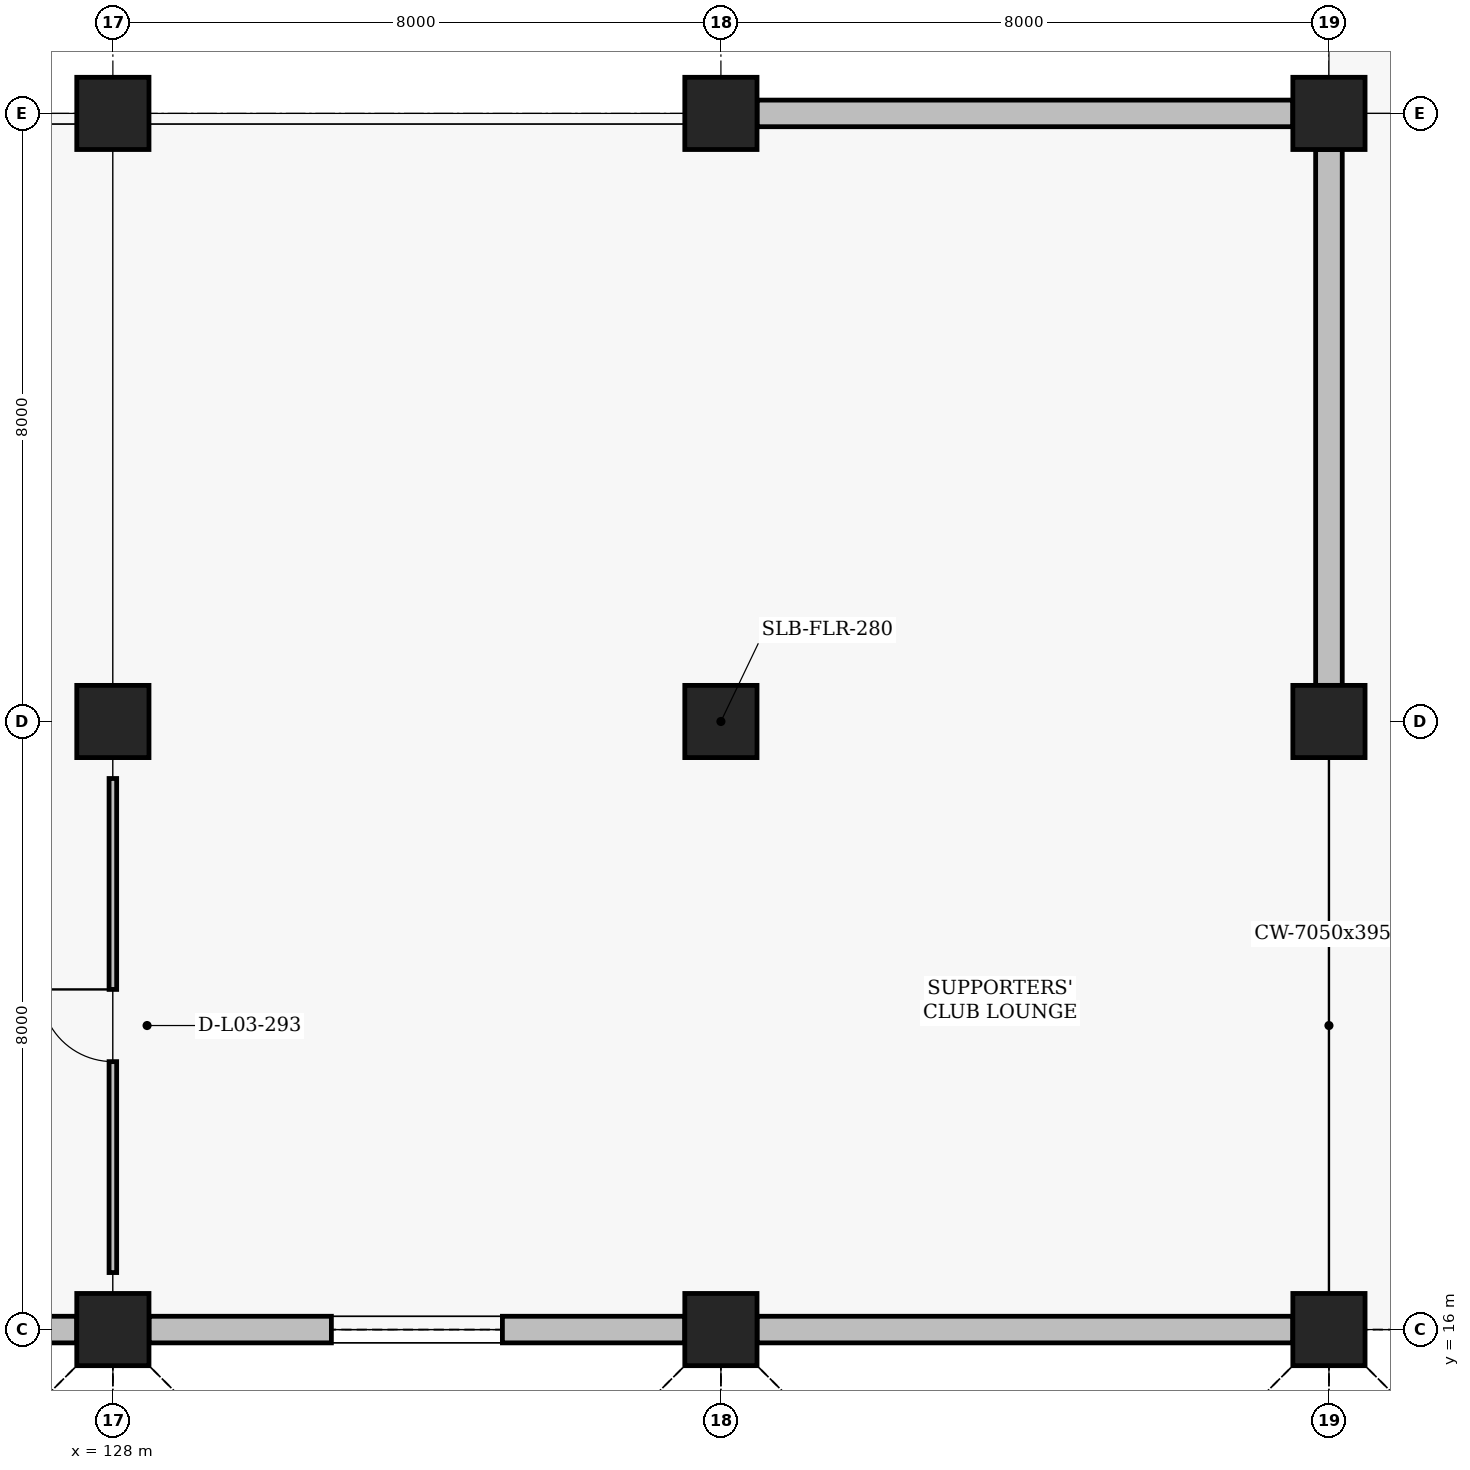
"""IFC4 building model, lengths in metres.
Left out: names, types, materials, properties, quantities, classifications, styles, units other than length and angle.
Written with IfcOpenShell. Run it as: python <this file> out.ifc"""

import sys

from ifc_helpers import new_model, si_unit, direction, frame, frame_2d, origin, origin_2d, place, context, subcontext, project, spatial, rectangle, extrude, element, fill, save


model = new_model("IFC4")
c1 = context("Model", 3, precision=1e-05, world=origin(), true_north=direction((0.0, 1.0)))
c2 = subcontext(c1, "Body", "Model", "MODEL_VIEW")
j1 = project(units=[si_unit("LENGTHUNIT", "METRE"), si_unit("PLANEANGLEUNIT", "RADIAN")], contexts=[c1])
p1 = place(None, origin())
s1 = spatial("IfcSite", under=j1, at=p1, CompositionType="ELEMENT")
p2 = place(p1, origin())
s2 = spatial("IfcBuilding", under=s1, at=p2, CompositionType="ELEMENT")
p3 = place(p2, frame((0.0, 0.0, 9.6)))
s3 = spatial("IfcBuildingStorey", under=s2, at=p3, CompositionType="ELEMENT", Elevation=9.6)
for number, where, z_axis, x_axis in (
    (1, (128.0, 16.0, 0.0), (0.0, 0.0, 1.0), (1.0, 0.0, 0.0)),
    (2, (128.0, 24.0, 0.0), (0.0, 0.0, 1.0), (1.0, 0.0, 0.0)),
    (3, (128.0, 32.0, 0.0), (0.0, 0.0, 1.0), (1.0, 0.0, 0.0)),
    (4, (136.0, 16.0, 0.0), (0.0, 0.0, 1.0), (1.0, 0.0, 0.0)),
    (5, (136.0, 24.0, 0.0), (0.0, 0.0, 1.0), (1.0, 0.0, 0.0)),
    (6, (136.0, 32.0, 0.0), (0.0, 0.0, 1.0), (1.0, 0.0, 0.0)),
    (7, (144.0, 16.0, 0.0), (0.0, 0.0, 1.0), (1.0, 0.0, 0.0)),
    (8, (144.0, 24.0, 0.0), (0.0, 0.0, 1.0), (1.0, 0.0, 0.0)),
    (9, (144.0, 32.0, 0.0), (0.0, 0.0, 1.0), (1.0, 0.0, 0.0)),
):
    element("IfcColumn", number, at=place(p3, frame(where, z_axis=z_axis, x_axis=x_axis)), inside=s3, PredefinedType="COLUMN", context=c2, shape_type="SweptSolid", body=[
        extrude(rectangle(XDim=0.95, YDim=0.95, at=origin_2d()), origin(), (0.0, 0.0, 1.0), 4.8),
    ])
p4 = place(p3, frame((120.475, 16.0, 0.0), z_axis=(0.0, 0.0, 1.0), x_axis=(1.0, 0.0, 0.0)))
e10 = element("IfcWall", 10, at=p4, inside=s3, PredefinedType="SOLIDWALL", context=c2, shape_type="SweptSolid", body=[
    extrude(rectangle(XDim=7.05, YDim=0.35, at=frame_2d((3.525, 0.0))), origin(), (0.0, 0.0, 1.0), 3.93),
])
p5 = place(p3, frame((128.475, 16.0, 0.0), z_axis=(0.0, 0.0, 1.0), x_axis=(1.0, 0.0, 0.0)))
e11 = element("IfcWall", 11, at=p5, inside=s3, PredefinedType="SOLIDWALL", context=c2, shape_type="SweptSolid", body=[
    extrude(rectangle(XDim=7.05, YDim=0.35, at=frame_2d((3.525, 0.0))), origin(), (0.0, 0.0, 1.0), 3.93),
])
p6 = place(p5, frame((2.4, 0.0, 0.95)))
e12 = element("IfcOpeningElement", 12, at=p6, cuts=e11, PredefinedType="OPENING", context=c2, shape_type="SweptSolid", body=[
    extrude(rectangle(XDim=2.25, YDim=1.9, at=frame_2d((1.125, 0.95))), frame((0.0, 0.185, 0.0), z_axis=(0.0, -1.0, 0.0), x_axis=(1.0, 0.0, 0.0)), (0.0, 0.0, 1.0), 0.37),
])
for number, where, z_axis, x_axis in (
    (13, (136.475, 16.0, 0.0), (0.0, 0.0, 1.0), (1.0, 0.0, 0.0)),
    (14, (136.475, 32.0, 0.0), (0.0, 0.0, 1.0), (1.0, 0.0, 0.0)),
):
    element("IfcWall", number, at=place(p3, frame(where, z_axis=z_axis, x_axis=x_axis)), inside=s3, PredefinedType="SOLIDWALL", context=c2, shape_type="SweptSolid", body=[
        extrude(rectangle(XDim=7.05, YDim=0.35, at=frame_2d((3.525, 0.0))), origin(), (0.0, 0.0, 1.0), 3.93),
    ])
p7 = place(p3, frame((144.0, 24.475, 0.0), z_axis=(0.0, 0.0, 1.0), x_axis=(0.0, 1.0, 0.0)))
e15 = element("IfcWall", 15, at=p7, inside=s3, PredefinedType="SOLIDWALL", context=c2, shape_type="SweptSolid", body=[
    extrude(rectangle(XDim=7.05, YDim=0.35, at=frame_2d((3.525, 0.0))), origin(), (0.0, 0.0, 1.0), 3.95),
])
p8 = place(p3, frame((128.0, 16.75, 0.0), z_axis=(0.0, 0.0, 1.0), x_axis=(0.0, 1.0, 0.0)))
e16 = element("IfcWall", 16, at=p8, inside=s3, PredefinedType="PARTITIONING", context=c2, shape_type="SweptSolid", body=[
    extrude(rectangle(XDim=6.5, YDim=0.1, at=frame_2d((3.25, 0.0))), origin(), (0.0, 0.0, 1.0), 3.93),
])
p9 = place(p8, frame((2.775, 0.0, 0.0)))
e17 = element("IfcOpeningElement", 17, at=p9, cuts=e16, PredefinedType="OPENING", context=c2, shape_type="SweptSolid", body=[
    extrude(rectangle(XDim=0.95, YDim=2.1, at=frame_2d((0.475, 1.05))), frame((0.0, 0.06, 0.0), z_axis=(0.0, -1.0, 0.0), x_axis=(1.0, 0.0, 0.0)), (0.0, 0.0, 1.0), 0.12),
])
p10 = place(p6, origin())
e18 = element("IfcWindow", 18, at=p10, inside=s3, PartitioningType="SINGLE_PANEL", PredefinedType="WINDOW", context=c2, shape_type="SweptSolid", body=[
    extrude(rectangle(XDim=2.25, YDim=1.9, at=frame_2d((1.125, 0.95))), frame((0.0, 0.03, 0.0), z_axis=(0.0, -1.0, 0.0), x_axis=(1.0, 0.0, 0.0)), (0.0, 0.0, 1.0), 0.06),
])
fill(e12, e18)
p11 = place(p9, origin())
e19 = element("IfcDoor", 19, at=p11, inside=s3, OperationType="SINGLE_SWING_RIGHT", PredefinedType="DOOR", context=c2, shape_type="SweptSolid", body=[
    extrude(rectangle(XDim=0.95, YDim=2.1, at=frame_2d((0.475, 1.05))), frame((0.0, 0.025, 0.0), z_axis=(0.0, -1.0, 0.0), x_axis=(1.0, 0.0, 0.0)), (0.0, 0.0, 1.0), 0.05),
])
fill(e17, e19)
save(model, sys.argv[1])
